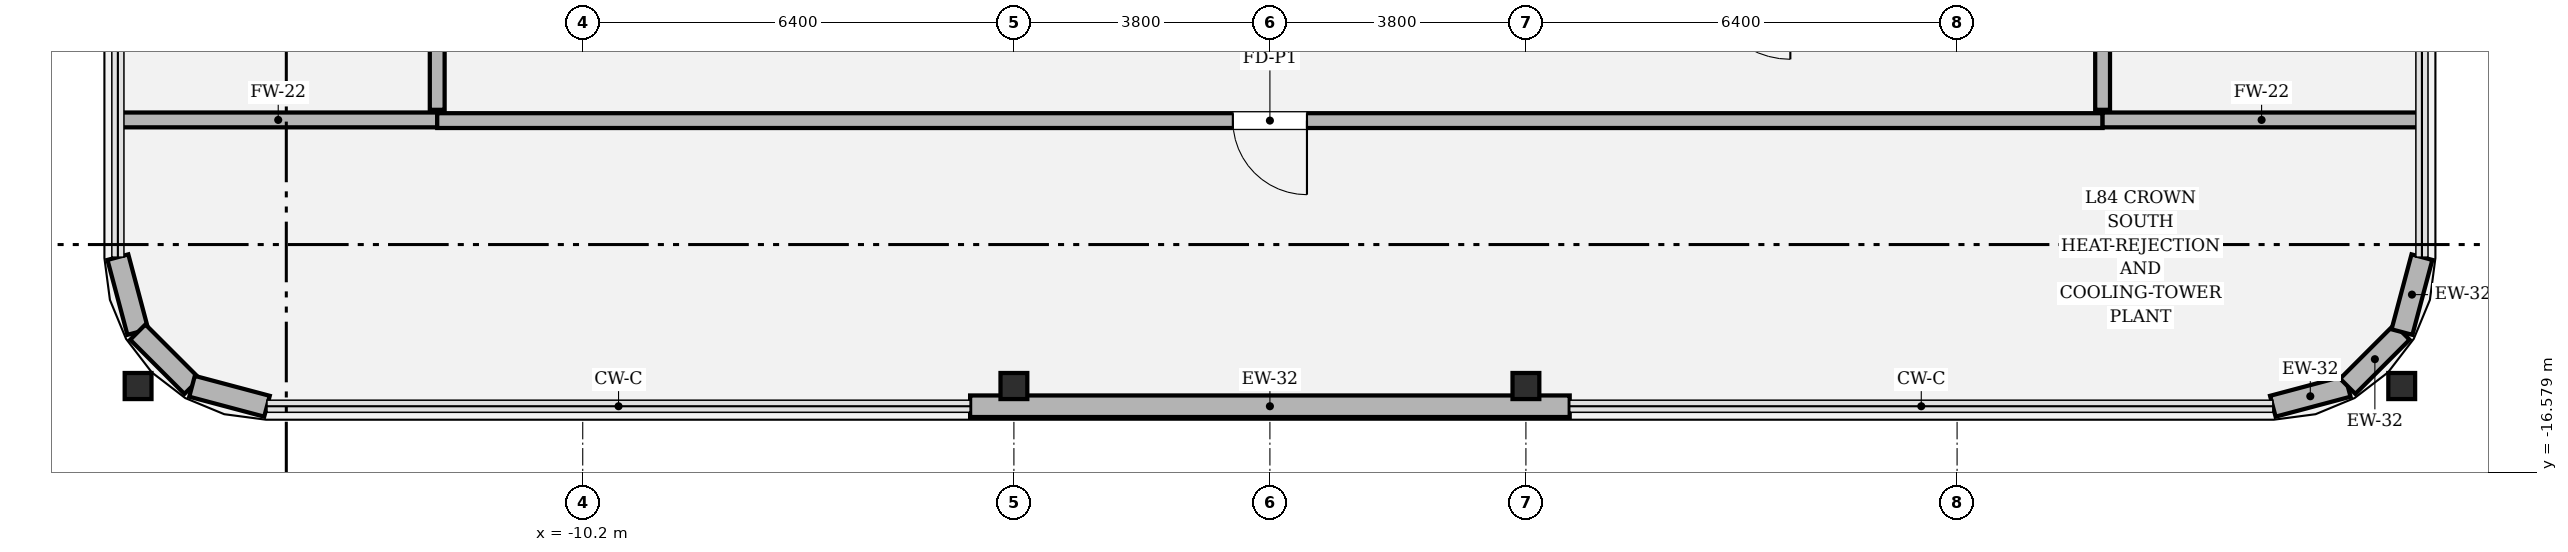
"""IFC4 building model, lengths in metres.
Left out: names, types, materials, properties, quantities, classifications, styles, units other than length and angle.
Written with IfcOpenShell. Run it as: python <this file> out.ifc"""

import sys

from ifc_helpers import new_model, si_unit, direction, frame, frame_2d, origin, origin_2d, place, context, subcontext, project, spatial, rectangle, i_section, extrude, element, fill, save


model = new_model("IFC4")
c1 = context("Model", 3, precision=1e-05, world=origin(), true_north=direction((0.0, 1.0)))
c2 = subcontext(c1, "Body", "Model", "MODEL_VIEW")
j1 = project(units=[si_unit("LENGTHUNIT", "METRE"), si_unit("PLANEANGLEUNIT", "RADIAN")], contexts=[c1])
p1 = place(None, origin())
s1 = spatial("IfcSite", under=j1, at=p1, CompositionType="ELEMENT")
p2 = place(p1, origin())
s2 = spatial("IfcBuilding", under=s1, at=p2, CompositionType="ELEMENT")
p3 = place(p2, frame((0.0, 0.0, 357.3)))
s3 = spatial("IfcBuildingStorey", under=s2, at=p3, CompositionType="ELEMENT", Elevation=357.3)
for number, where, z_axis, x_axis in (
    (1, (-3.8, -15.3, 0.0), (0.0, 0.0, 1.0), (1.0, 0.0, 0.0)),
    (2, (3.8, -15.3, 0.0), (0.0, 0.0, 1.0), (1.0, 0.0, 0.0)),
    (3, (-16.8, -15.3, 0.0), (0.0, 0.0, 1.0), (1.0, 0.0, 0.0)),
    (4, (16.8, -15.3, 0.0), (0.0, 0.0, 1.0), (1.0, 0.0, 0.0)),
):
    element("IfcColumn", number, at=place(p3, frame(where, z_axis=z_axis, x_axis=x_axis)), inside=s3, PredefinedType="COLUMN", context=c2, shape_type="SweptSolid", body=[
        extrude(i_section(OverallWidth=0.398, OverallDepth=0.387, WebThickness=0.021, FlangeThickness=0.033, FilletRadius=0.018, at=origin_2d()), origin(), (0.0, 0.0, 1.0), 4.498),
    ])
p4 = place(p3, frame((-4.45, -15.6, 0.0), z_axis=(0.0, 0.0, 1.0), x_axis=(1.0, 0.0, 0.0)))
e5 = element("IfcWall", 5, at=p4, inside=s3, PredefinedType="SOLIDWALL", context=c2, shape_type="SweptSolid", body=[
    extrude(rectangle(XDim=8.9, YDim=0.32, at=frame_2d((4.45, 0.0))), origin(), (0.0, 0.0, 1.0), 3.894),
])
p5 = place(p3, frame((14.887, -15.6, 0.0), z_axis=(0.0, 0.0, 1.0), x_axis=(0.966270139534, 0.257530614576, 0.0)))
e6 = element("IfcWall", 6, at=p5, inside=s3, PredefinedType="SOLIDWALL", context=c2, shape_type="SweptSolid", body=[
    extrude(rectangle(XDim=1.151, YDim=0.32, at=frame_2d((0.575, 0.0))), origin(), (0.0, 0.0, 1.0), 3.894),
])
p6 = place(p3, frame((15.999, -15.304, 0.0), z_axis=(0.0, 0.0, 1.0), x_axis=(0.707106781187, 0.707106781187, 0.0)))
e7 = element("IfcWall", 7, at=p6, inside=s3, PredefinedType="SOLIDWALL", context=c2, shape_type="SweptSolid", body=[
    extrude(rectangle(XDim=1.138, YDim=0.32, at=frame_2d((0.569, 0.0))), origin(), (0.0, 0.0, 1.0), 2.934),
])
for number, where, z_axis, x_axis in (
    (8, (16.804, -14.499, 0.0), (0.0, 0.0, 1.0), (0.258, 0.966, 0.0)),
    (9, (-17.1, -13.387, 0.0), (0.0, 0.0, 1.0), (0.258, -0.966, 0.0)),
):
    element("IfcWall", number, at=place(p3, frame(where, z_axis=z_axis, x_axis=x_axis)), inside=s3, PredefinedType="SOLIDWALL", context=c2, shape_type="SweptSolid", body=[
        extrude(rectangle(XDim=1.151, YDim=0.32, at=frame_2d((0.575, 0.0))), origin(), (0.0, 0.0, 1.0), 3.894),
    ])
p7 = place(p3, frame((-16.804, -14.499, 0.0), z_axis=(0.0, 0.0, 1.0), x_axis=(0.707106781187, -0.707106781187, 0.0)))
e10 = element("IfcWall", 10, at=p7, inside=s3, PredefinedType="SOLIDWALL", context=c2, shape_type="SweptSolid", body=[
    extrude(rectangle(XDim=1.138, YDim=0.32, at=frame_2d((0.569, 0.0))), origin(), (0.0, 0.0, 1.0), 2.934),
])
p8 = place(p3, frame((-15.999, -15.304, 0.0), z_axis=(0.0, 0.0, 1.0), x_axis=(0.966270139534, -0.257530614576, 0.0)))
e11 = element("IfcWall", 11, at=p8, inside=s3, PredefinedType="SOLIDWALL", context=c2, shape_type="SweptSolid", body=[
    extrude(rectangle(XDim=1.151, YDim=0.32, at=frame_2d((0.575, 0.0))), origin(), (0.0, 0.0, 1.0), 3.894),
])
p9 = place(p3, frame((-17.08, -11.35, 0.0), z_axis=(0.0, 0.0, 1.0), x_axis=(1.0, 0.0, 0.0)))
e12 = element("IfcWall", 12, at=p9, inside=s3, PredefinedType="SOLIDWALL", context=c2, shape_type="SweptSolid", body=[
    extrude(rectangle(XDim=4.72, YDim=0.22, at=frame_2d((2.36, 0.0))), origin(), (0.0, 0.0, 1.0), 2.934),
])
p10 = place(p3, frame((-12.36, -11.36, 0.0), z_axis=(0.0, 0.0, 1.0), x_axis=(1.0, 0.0, 0.0)))
e13 = element("IfcWall", 13, at=p10, inside=s3, PredefinedType="SOLIDWALL", context=c2, shape_type="SweptSolid", body=[
    extrude(rectangle(XDim=24.72, YDim=0.22, at=frame_2d((12.36, 0.0))), origin(), (0.0, 0.0, 1.0), 2.934),
])
p11 = place(p10, frame((11.81, 0.0, 0.0)))
e14 = element("IfcOpeningElement", 14, at=p11, cuts=e13, PredefinedType="OPENING", context=c2, shape_type="SweptSolid", body=[
    extrude(rectangle(XDim=1.1, YDim=2.2, at=frame_2d((0.55, 1.1))), frame((0.0, 0.12, 0.0), z_axis=(0.0, -1.0, 0.0), x_axis=(1.0, 0.0, 0.0)), (0.0, 0.0, 1.0), 0.24),
])
p12 = place(p3, frame((12.36, -11.35, 0.0), z_axis=(0.0, 0.0, 1.0), x_axis=(1.0, 0.0, 0.0)))
e15 = element("IfcWall", 15, at=p12, inside=s3, PredefinedType="SOLIDWALL", context=c2, shape_type="SweptSolid", body=[
    extrude(rectangle(XDim=4.72, YDim=0.22, at=frame_2d((2.36, 0.0))), origin(), (0.0, 0.0, 1.0), 2.934),
])
p13 = place(p3, frame((-12.36, 11.2, 0.0), z_axis=(0.0, 0.0, 1.0), x_axis=(0.0, -1.0, 0.0)))
e16 = element("IfcWall", 16, at=p13, inside=s3, PredefinedType="SOLIDWALL", context=c2, shape_type="SweptSolid", body=[
    extrude(rectangle(XDim=22.4, YDim=0.22, at=frame_2d((11.2, 0.0))), origin(), (0.0, 0.0, 1.0), 2.934),
])
p14 = place(p13, frame((10.65, 0.0, 0.0)))
e17 = element("IfcOpeningElement", 17, at=p14, cuts=e16, PredefinedType="OPENING", context=c2, shape_type="SweptSolid", body=[
    extrude(rectangle(XDim=1.1, YDim=2.2, at=frame_2d((0.55, 1.1))), frame((0.0, 0.12, 0.0), z_axis=(0.0, -1.0, 0.0), x_axis=(1.0, 0.0, 0.0)), (0.0, 0.0, 1.0), 0.24),
])
p15 = place(p3, frame((12.36, -11.2, 0.0), z_axis=(0.0, 0.0, 1.0), x_axis=(0.0, 1.0, 0.0)))
e18 = element("IfcWall", 18, at=p15, inside=s3, PredefinedType="SOLIDWALL", context=c2, shape_type="SweptSolid", body=[
    extrude(rectangle(XDim=22.4, YDim=0.22, at=frame_2d((11.2, 0.0))), origin(), (0.0, 0.0, 1.0), 2.934),
])
p16 = place(p15, frame((10.65, 0.0, 0.0)))
e19 = element("IfcOpeningElement", 19, at=p16, cuts=e18, PredefinedType="OPENING", context=c2, shape_type="SweptSolid", body=[
    extrude(rectangle(XDim=1.1, YDim=2.2, at=frame_2d((0.55, 1.1))), frame((0.0, 0.12, 0.0), z_axis=(0.0, -1.0, 0.0), x_axis=(1.0, 0.0, 0.0)), (0.0, 0.0, 1.0), 0.24),
])
p17 = place(p11, origin())
e20 = element("IfcDoor", 20, at=p17, inside=s3, OperationType="SINGLE_SWING_RIGHT", PredefinedType="DOOR", context=c2, shape_type="SweptSolid", body=[
    extrude(rectangle(XDim=1.1, YDim=2.2, at=frame_2d((0.55, 1.1))), frame((0.0, 0.025, 0.0), z_axis=(0.0, -1.0, 0.0), x_axis=(1.0, 0.0, 0.0)), (0.0, 0.0, 1.0), 0.05),
])
fill(e14, e20)
save(model, sys.argv[1])
